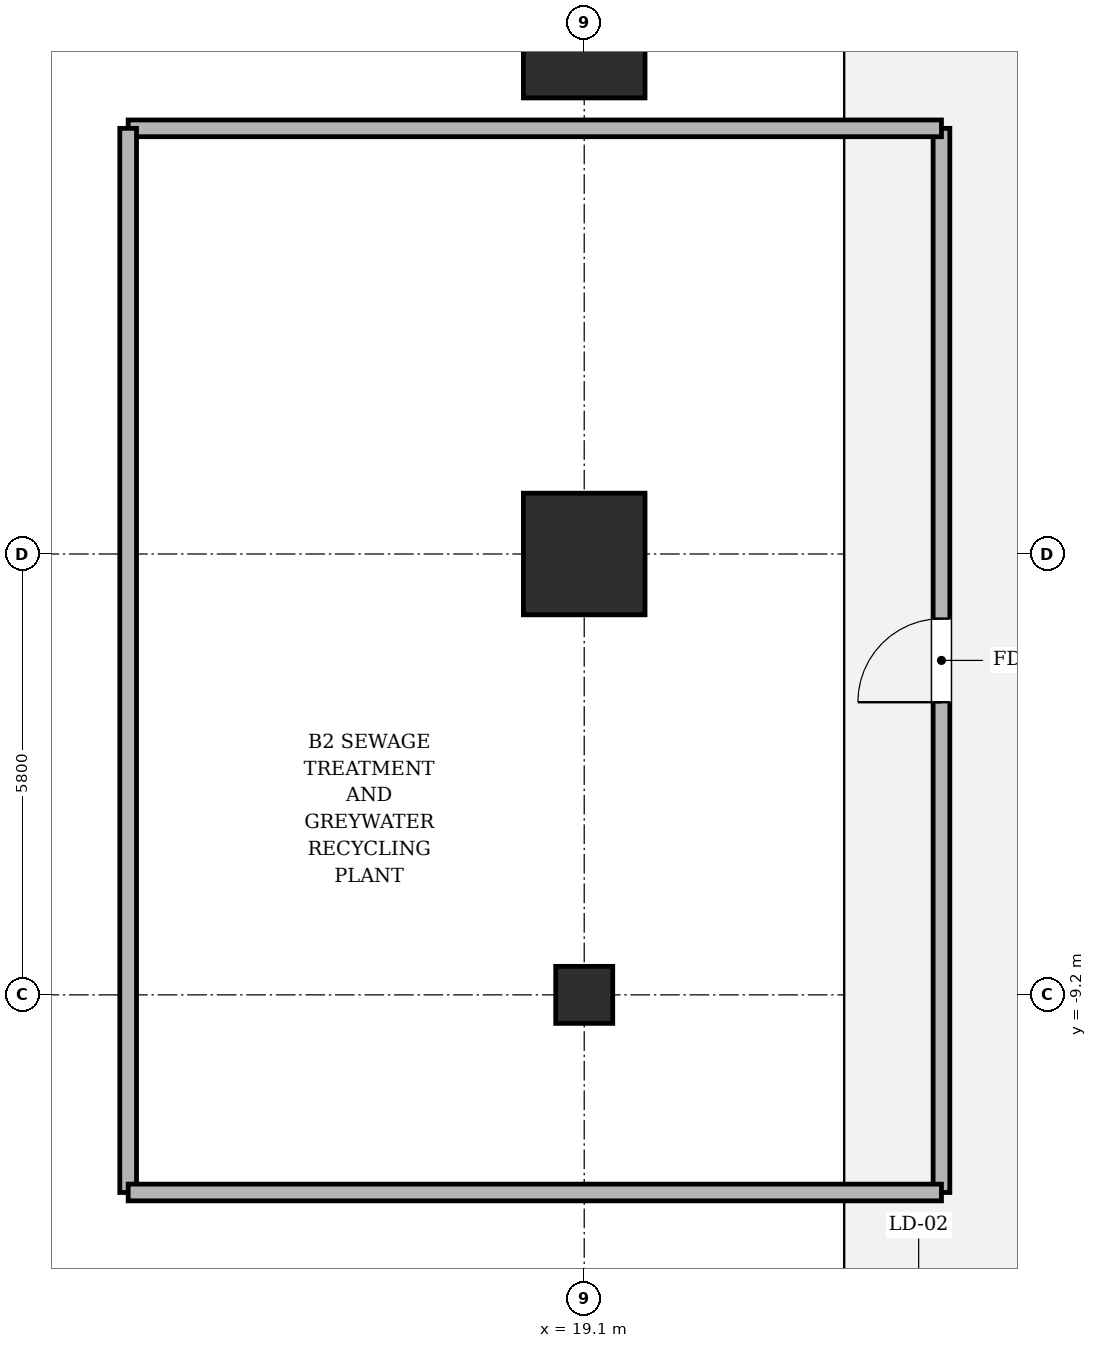
"""IFC4 building model, lengths in metres.
Left out: names, types, materials, properties, quantities, classifications, styles, units other than length and angle.
Written with IfcOpenShell. Run it as: python <this file> out.ifc"""

import sys

from ifc_helpers import new_model, si_unit, direction, frame, frame_2d, origin, origin_2d, place, context, subcontext, project, spatial, rectangle, hollow_rectangle, circle, extrude, element, fill, save


model = new_model("IFC4")
c1 = context("Model", 3, precision=1e-05, world=origin(), true_north=direction((0.0, 1.0)))
c2 = subcontext(c1, "Body", "Model", "MODEL_VIEW")
j1 = project(units=[si_unit("LENGTHUNIT", "METRE"), si_unit("PLANEANGLEUNIT", "RADIAN")], contexts=[c1])
p1 = place(None, origin())
s1 = spatial("IfcSite", under=j1, at=p1, CompositionType="ELEMENT")
p2 = place(p1, origin())
s2 = spatial("IfcBuilding", under=s1, at=p2, CompositionType="ELEMENT")
p3 = place(p2, frame((0.0, 0.0, -9.6)))
s3 = spatial("IfcBuildingStorey", under=s2, at=p3, CompositionType="ELEMENT", Elevation=-9.6)
for number, where, z_axis, x_axis in (
    (1, (19.1, -3.4, 0.0), (0.0, 0.0, 1.0), (1.0, 0.0, 0.0)),
    (2, (19.1, 3.4, 0.0), (0.0, 0.0, 1.0), (1.0, 0.0, 0.0)),
):
    element("IfcColumn", number, at=place(p3, frame(where, z_axis=z_axis, x_axis=x_axis)), inside=s3, PredefinedType="COLUMN", context=c2, shape_type="SweptSolid", body=[
        extrude(hollow_rectangle(XDim=1.6, YDim=1.6, WallThickness=0.05, at=origin_2d()), origin(), (0.0, 0.0, 1.0), 4.8),
    ])
p4 = place(p3, frame((19.1, -9.2, 0.0), z_axis=(0.0, 0.0, 1.0), x_axis=(1.0, 0.0, 0.0)))
e3 = element("IfcColumn", 3, at=p4, inside=s3, PredefinedType="PILASTER", context=c2, shape_type="SweptSolid", body=[
    extrude(circle(Radius=0.375, at=origin_2d()), origin(), (0.0, 0.0, 1.0), 4.8),
])
p5 = place(p3, frame((23.8, -11.8, 0.0), z_axis=(0.0, 0.0, 1.0), x_axis=(0.0, 1.0, 0.0)))
e4 = element("IfcWall", 4, at=p5, inside=s3, PredefinedType="SOLIDWALL", context=c2, shape_type="SweptSolid", body=[
    extrude(rectangle(XDim=14.0, YDim=0.22, at=frame_2d((7.0, 0.0))), origin(), (0.0, 0.0, 1.0), 3.814),
])
p6 = place(p5, frame((6.45, 0.0, 0.0)))
e5 = element("IfcOpeningElement", 5, at=p6, cuts=e4, PredefinedType="OPENING", context=c2, shape_type="SweptSolid", body=[
    extrude(rectangle(XDim=1.1, YDim=2.2, at=frame_2d((0.55, 1.1))), frame((0.0, 0.12, 0.0), z_axis=(0.0, -1.0, 0.0), x_axis=(1.0, 0.0, 0.0)), (0.0, 0.0, 1.0), 0.24),
])
p7 = place(p3, frame((23.8, 2.2, 0.0), z_axis=(0.0, 0.0, 1.0), x_axis=(-1.0, 0.0, 0.0)))
e6 = element("IfcWall", 6, at=p7, inside=s3, PredefinedType="SOLIDWALL", context=c2, shape_type="SweptSolid", body=[
    extrude(rectangle(XDim=10.7, YDim=0.22, at=frame_2d((5.35, 0.0))), origin(), (0.0, 0.0, 1.0), 3.814),
])
p8 = place(p3, frame((13.1, 2.2, 0.0), z_axis=(0.0, 0.0, 1.0), x_axis=(0.0, -1.0, 0.0)))
e7 = element("IfcWall", 7, at=p8, inside=s3, PredefinedType="SOLIDWALL", context=c2, shape_type="SweptSolid", body=[
    extrude(rectangle(XDim=14.0, YDim=0.22, at=frame_2d((7.0, 0.0))), origin(), (0.0, 0.0, 1.0), 3.814),
])
p9 = place(p3, frame((13.1, -11.8, 0.0), z_axis=(0.0, 0.0, 1.0), x_axis=(1.0, 0.0, 0.0)))
e8 = element("IfcWall", 8, at=p9, inside=s3, PredefinedType="SOLIDWALL", context=c2, shape_type="SweptSolid", body=[
    extrude(rectangle(XDim=10.7, YDim=0.22, at=frame_2d((5.35, 0.0))), origin(), (0.0, 0.0, 1.0), 3.814),
])
p10 = place(p6, origin())
e9 = element("IfcDoor", 9, at=p10, inside=s3, OperationType="SINGLE_SWING_LEFT", PredefinedType="DOOR", context=c2, shape_type="SweptSolid", body=[
    extrude(rectangle(XDim=1.1, YDim=2.2, at=frame_2d((0.55, 1.1))), frame((0.0, 0.025, 0.0), z_axis=(0.0, -1.0, 0.0), x_axis=(1.0, 0.0, 0.0)), (0.0, 0.0, 1.0), 0.05),
])
fill(e5, e9)
save(model, sys.argv[1])
